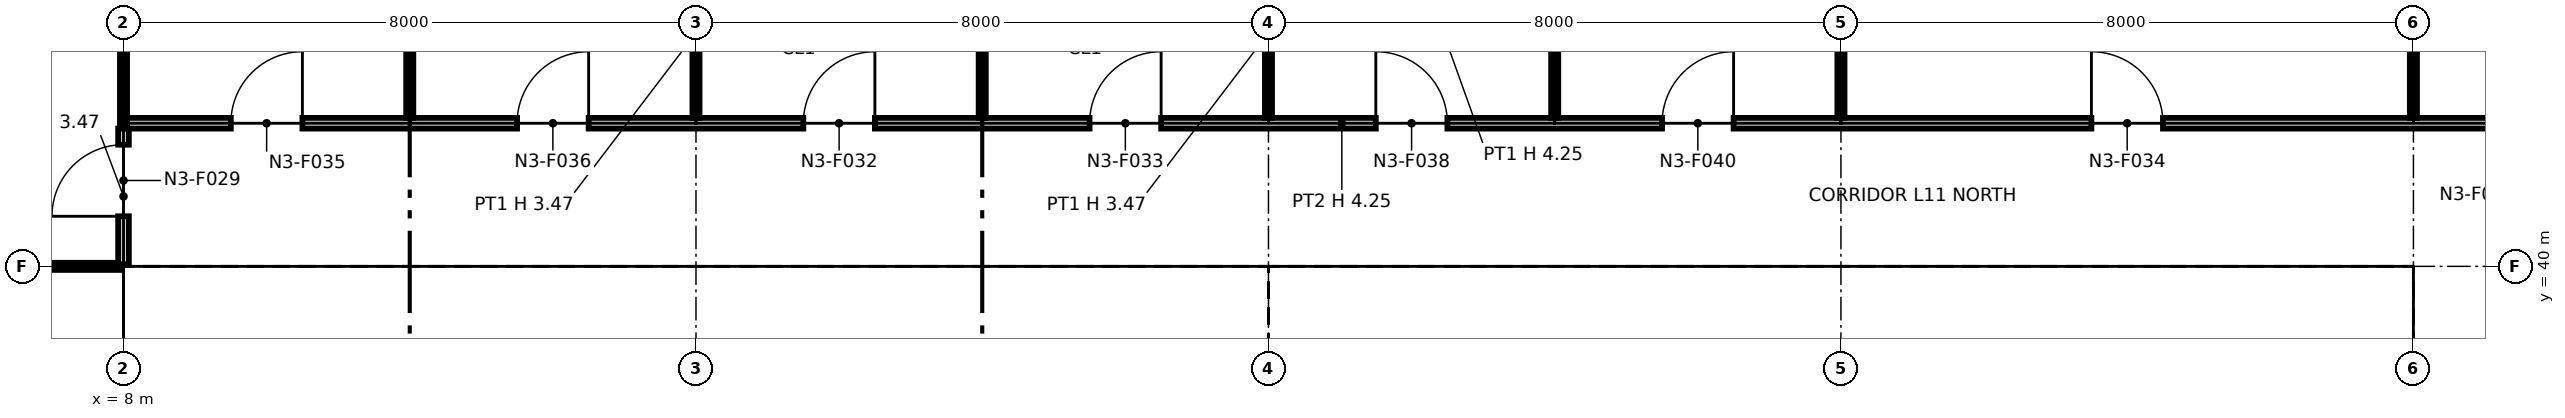
"""IFC4 building model, lengths in metres.
Left out: names, types, materials, properties, quantities, classifications, styles, units other than length and angle.
Written with IfcOpenShell. Run it as: python <this file> out.ifc"""

import sys

from ifc_helpers import new_model, si_unit, direction, frame, frame_2d, origin, origin_2d, place, context, subcontext, project, spatial, polyline, rectangle, i_section, outline, extrude, element, fill, save


model = new_model("IFC4")
c1 = context("Model", 3, precision=1e-05, world=origin(), true_north=direction((0.0, 1.0)))
c2 = subcontext(c1, "Body", "Model", "MODEL_VIEW")
j1 = project(units=[si_unit("LENGTHUNIT", "METRE"), si_unit("PLANEANGLEUNIT", "RADIAN")], contexts=[c1])
p1 = place(None, origin())
s1 = spatial("IfcSite", under=j1, at=p1, CompositionType="ELEMENT")
p2 = place(p1, origin())
s2 = spatial("IfcBuilding", under=s1, at=p2, CompositionType="ELEMENT")
p3 = place(p2, frame((0.0, 0.0, 65.6)))
s3 = spatial("IfcBuildingStorey", under=s2, at=p3, CompositionType="ELEMENT", Elevation=65.6)
for number, where, z_axis, x_axis in (
    (1, (8.0, 40.0, 0.0), (0.0, 0.0, 1.0), (1.0, 0.0, 0.0)),
    (2, (16.0, 40.0, 0.0), (0.0, 0.0, 1.0), (1.0, 0.0, 0.0)),
):
    element("IfcColumn", number, at=place(p3, frame(where, z_axis=z_axis, x_axis=x_axis)), inside=s3, PredefinedType="COLUMN", context=c2, shape_type="SweptSolid", body=[
        extrude(i_section(OverallWidth=0.394, OverallDepth=0.376, WebThickness=0.017, FlangeThickness=0.028, at=origin_2d()), origin(), (0.0, 0.0, 1.0), 4.25),
    ])
p4 = place(p3, frame((24.0, 40.0, 0.0), z_axis=(0.0, 0.0, 1.0), x_axis=(1.0, 0.0, 0.0)))
e3 = element("IfcColumn", 3, at=p4, inside=s3, PredefinedType="COLUMN", context=c2, shape_type="SweptSolid", body=[
    extrude(i_section(OverallWidth=0.399, OverallDepth=0.386, WebThickness=0.021, FlangeThickness=0.033, at=origin_2d()), origin(), (0.0, 0.0, 1.0), 4.25),
])
for number, where, z_axis, x_axis in (
    (4, (32.0, 40.0, 0.0), (0.0, 0.0, 1.0), (1.0, 0.0, 0.0)),
    (5, (40.0, 40.0, 0.0), (0.0, 0.0, 1.0), (1.0, 0.0, 0.0)),
):
    element("IfcColumn", number, at=place(p3, frame(where, z_axis=z_axis, x_axis=x_axis)), inside=s3, PredefinedType="COLUMN", context=c2, shape_type="SweptSolid", body=[
        extrude(i_section(OverallWidth=0.371, OverallDepth=0.361, WebThickness=0.012, FlangeThickness=0.02, at=origin_2d()), origin(), (0.0, 0.0, 1.0), 4.25),
    ])
p5 = place(p3, frame((8.75, 32.85, 0.0), z_axis=(0.0, 0.0, 1.0), x_axis=(0.0, 1.0, 0.0)))
e6 = element("IfcWall", 6, at=p5, inside=s3, PredefinedType="PARTITIONING", context=c2, shape_type="SweptSolid", body=[
    extrude(outline(polyline([(0.0, 0.0), (6.3, 0.0), (6.3, 4.25), (3.231, 4.25), (3.23, 3.789), (3.07, 3.789), (3.069, 4.25), (0.0, 4.25), (0.0, 0.0)])), frame((0.0, 0.1, 0.0), z_axis=(0.0, -1.0, 0.0), x_axis=(1.0, 0.0, 0.0)), (0.0, 0.0, 1.0), 0.2),
])
p6 = place(p3, frame((8.65, 39.25, 0.0), z_axis=(0.0, 0.0, 1.0), x_axis=(1.0, 0.0, 0.0)))
e7 = element("IfcWall", 7, at=p6, inside=s3, PredefinedType="PARTITIONING", context=c2, shape_type="SweptSolid", body=[
    extrude(outline(polyline([(0.0, 0.0), (14.7, 0.0), (14.7, 4.25), (7.469, 4.25), (7.469, 3.632), (7.231, 3.632), (7.23, 4.25), (0.0, 4.25), (0.0, 0.0)])), frame((0.0, 0.1, 0.0), z_axis=(0.0, -1.0, 0.0), x_axis=(1.0, 0.0, 0.0)), (0.0, 0.0, 1.0), 0.2),
])
for number, where, z_axis, x_axis in (
    (8, (11.875, 34.95, 0.0), (0.0, 0.0, 1.0), (0.0, 1.0, 0.0)),
    (9, (13.925, 34.95, 0.0), (0.0, 0.0, 1.0), (0.0, 1.0, 0.0)),
):
    element("IfcWall", number, at=place(p3, frame(where, z_axis=z_axis, x_axis=x_axis)), inside=s3, PredefinedType="PARTITIONING", context=c2, shape_type="SweptSolid", body=[
        extrude(outline(polyline([(0.0, 0.0), (4.2, 0.0), (4.2, 4.25), (1.132, 4.25), (1.131, 3.789), (0.969, 3.789), (0.969, 4.25), (0.0, 4.25), (0.0, 0.0)])), frame((0.0, 0.075, 0.0), z_axis=(0.0, -1.0, 0.0), x_axis=(1.0, 0.0, 0.0)), (0.0, 0.0, 1.0), 0.15),
    ])
p7 = place(p3, frame((16.0, 34.95, 0.0), z_axis=(0.0, 0.0, 1.0), x_axis=(0.0, 1.0, 0.0)))
e10 = element("IfcWall", 10, at=p7, inside=s3, PredefinedType="PARTITIONING", context=c2, shape_type="SweptSolid", body=[
    extrude(rectangle(XDim=4.2, YDim=0.6, at=frame_2d((2.1, 0.0))), origin(), (0.0, 0.0, 1.0), 3.632),
])
for number, where, z_axis, x_axis in (
    (11, (19.2, 32.85, 0.0), (0.0, 0.0, 1.0), (0.0, 1.0, 0.0)),
    (12, (23.25, 32.85, 0.0), (0.0, 0.0, 1.0), (0.0, 1.0, 0.0)),
):
    element("IfcWall", number, at=place(p3, frame(where, z_axis=z_axis, x_axis=x_axis)), inside=s3, PredefinedType="PARTITIONING", context=c2, shape_type="SweptSolid", body=[
        extrude(rectangle(XDim=6.3, YDim=0.2, at=frame_2d((3.15, 0.0))), origin(), (0.0, 0.0, 1.0), 4.25),
    ])
p8 = place(p3, frame((24.75, 32.85, 0.0), z_axis=(0.0, 0.0, 1.0), x_axis=(0.0, 1.0, 0.0)))
e13 = element("IfcWall", 13, at=p8, inside=s3, PredefinedType="PARTITIONING", context=c2, shape_type="SweptSolid", body=[
    extrude(outline(polyline([(0.0, 0.0), (6.3, 0.0), (6.3, 4.25), (3.231, 4.25), (3.23, 3.789), (3.07, 3.789), (3.069, 4.25), (0.0, 4.25), (0.0, 0.0)])), frame((0.0, 0.1, 0.0), z_axis=(0.0, -1.0, 0.0), x_axis=(1.0, 0.0, 0.0)), (0.0, 0.0, 1.0), 0.2),
])
p9 = place(p3, frame((24.65, 39.25, 0.0), z_axis=(0.0, 0.0, 1.0), x_axis=(1.0, 0.0, 0.0)))
e14 = element("IfcWall", 14, at=p9, inside=s3, PredefinedType="PARTITIONING", context=c2, shape_type="SweptSolid", body=[
    extrude(outline(polyline([(0.0, 0.0), (14.7, 0.0), (14.7, 4.25), (7.469, 4.25), (7.469, 3.632), (7.231, 3.632), (7.23, 4.25), (0.0, 4.25), (0.0, 0.0)])), frame((0.0, 0.1, 0.0), z_axis=(0.0, -1.0, 0.0), x_axis=(1.0, 0.0, 0.0)), (0.0, 0.0, 1.0), 0.2),
])
for number, where, z_axis, x_axis in (
    (15, (27.2, 36.6, 0.0), (0.0, 0.0, 1.0), (0.0, 1.0, 0.0)),
    (16, (29.5, 36.6, 0.0), (0.0, 0.0, 1.0), (0.0, 1.0, 0.0)),
):
    element("IfcWall", number, at=place(p3, frame(where, z_axis=z_axis, x_axis=x_axis)), inside=s3, PredefinedType="PARTITIONING", context=c2, shape_type="SweptSolid", body=[
        extrude(rectangle(XDim=2.55, YDim=0.2, at=frame_2d((1.275, 0.0))), origin(), (0.0, 0.0, 1.0), 4.25),
    ])
p10 = place(p3, frame((32.0, 36.6, 0.0), z_axis=(0.0, 0.0, 1.0), x_axis=(0.0, 1.0, 0.0)))
e17 = element("IfcWall", 17, at=p10, inside=s3, PredefinedType="PARTITIONING", context=c2, shape_type="SweptSolid", body=[
    extrude(rectangle(XDim=2.55, YDim=0.6, at=frame_2d((1.275, 0.0))), origin(), (0.0, 0.0, 1.0), 3.632),
])
for number, where, z_axis, x_axis in (
    (18, (35.6, 32.85, 0.0), (0.0, 0.0, 1.0), (0.0, 1.0, 0.0)),
    (19, (39.25, 32.85, 0.0), (0.0, 0.0, 1.0), (0.0, 1.0, 0.0)),
):
    element("IfcWall", number, at=place(p3, frame(where, z_axis=z_axis, x_axis=x_axis)), inside=s3, PredefinedType="PARTITIONING", context=c2, shape_type="SweptSolid", body=[
        extrude(rectangle(XDim=6.3, YDim=0.2, at=frame_2d((3.15, 0.0))), origin(), (0.0, 0.0, 1.0), 4.25),
    ])
p11 = place(p3, frame((4.05, 40.0, 0.0), z_axis=(0.0, 0.0, 1.0), x_axis=(1.0, 0.0, 0.0)))
e20 = element("IfcWall", 20, at=p11, inside=s3, PredefinedType="PARTITIONING", context=c2, shape_type="SweptSolid", body=[
    extrude(rectangle(XDim=3.92, YDim=0.1, at=frame_2d((1.96, 0.0))), origin(), (0.0, 0.0, 1.0), 3.47),
])
p12 = place(p3, frame((8.0, 40.03, 0.0), z_axis=(0.0, 0.0, 1.0), x_axis=(0.0, 1.0, 0.0)))
e21 = element("IfcWall", 21, at=p12, inside=s3, PredefinedType="PARTITIONING", context=c2, shape_type="SweptSolid", body=[
    extrude(rectangle(XDim=1.895, YDim=0.15, at=frame_2d((0.948, 0.0))), origin(), (0.0, 0.0, 1.0), 3.47),
])
p13 = place(p12, frame((0.67, 0.0, 0.0)))
e22 = element("IfcOpeningElement", 22, at=p13, cuts=e21, PredefinedType="OPENING", context=c2, shape_type="SweptSolid", body=[
    extrude(rectangle(XDim=1.0, YDim=2.1, at=frame_2d((0.5, 1.05))), frame((0.0, 0.085, 0.0), z_axis=(0.0, -1.0, 0.0), x_axis=(1.0, 0.0, 0.0)), (0.0, 0.0, 1.0), 0.17),
])
p14 = place(p3, frame((8.05, 42.0, 0.0), z_axis=(0.0, 0.0, 1.0), x_axis=(1.0, 0.0, 0.0)))
e23 = element("IfcWall", 23, at=p14, inside=s3, PredefinedType="PARTITIONING", context=c2, shape_type="SweptSolid", body=[
    extrude(rectangle(XDim=33.95, YDim=0.15, at=frame_2d((16.975, 0.0))), origin(), (0.0, 0.0, 1.0), 4.25),
])
p15 = place(p14, frame((9.45, 0.0, 0.0)))
e24 = element("IfcOpeningElement", 24, at=p15, cuts=e23, PredefinedType="OPENING", context=c2, shape_type="SweptSolid", body=[
    extrude(rectangle(XDim=1.0, YDim=2.1, at=frame_2d((0.5, 1.05))), frame((0.0, 0.085, 0.0), z_axis=(0.0, -1.0, 0.0), x_axis=(1.0, 0.0, 0.0)), (0.0, 0.0, 1.0), 0.17),
])
p16 = place(p14, frame((13.45, 0.0, 0.0)))
e25 = element("IfcOpeningElement", 25, at=p16, cuts=e23, PredefinedType="OPENING", context=c2, shape_type="SweptSolid", body=[
    extrude(rectangle(XDim=1.0, YDim=2.1, at=frame_2d((0.5, 1.05))), frame((0.0, 0.085, 0.0), z_axis=(0.0, -1.0, 0.0), x_axis=(1.0, 0.0, 0.0)), (0.0, 0.0, 1.0), 0.17),
])
p17 = place(p14, frame((27.45, 0.0, 0.0)))
e26 = element("IfcOpeningElement", 26, at=p17, cuts=e23, PredefinedType="OPENING", context=c2, shape_type="SweptSolid", body=[
    extrude(rectangle(XDim=1.0, YDim=2.1, at=frame_2d((0.5, 1.05))), frame((0.0, 0.085, 0.0), z_axis=(0.0, -1.0, 0.0), x_axis=(1.0, 0.0, 0.0)), (0.0, 0.0, 1.0), 0.17),
])
p18 = place(p14, frame((1.45, 0.0, 0.0)))
e27 = element("IfcOpeningElement", 27, at=p18, cuts=e23, PredefinedType="OPENING", context=c2, shape_type="SweptSolid", body=[
    extrude(rectangle(XDim=1.0, YDim=2.1, at=frame_2d((0.5, 1.05))), frame((0.0, 0.085, 0.0), z_axis=(0.0, -1.0, 0.0), x_axis=(1.0, 0.0, 0.0)), (0.0, 0.0, 1.0), 0.17),
])
p19 = place(p14, frame((5.45, 0.0, 0.0)))
e28 = element("IfcOpeningElement", 28, at=p19, cuts=e23, PredefinedType="OPENING", context=c2, shape_type="SweptSolid", body=[
    extrude(rectangle(XDim=1.0, YDim=2.1, at=frame_2d((0.5, 1.05))), frame((0.0, 0.085, 0.0), z_axis=(0.0, -1.0, 0.0), x_axis=(1.0, 0.0, 0.0)), (0.0, 0.0, 1.0), 0.17),
])
p20 = place(p14, frame((17.45, 0.0, 0.0)))
e29 = element("IfcOpeningElement", 29, at=p20, cuts=e23, PredefinedType="OPENING", context=c2, shape_type="SweptSolid", body=[
    extrude(rectangle(XDim=1.0, YDim=2.1, at=frame_2d((0.5, 1.05))), frame((0.0, 0.085, 0.0), z_axis=(0.0, -1.0, 0.0), x_axis=(1.0, 0.0, 0.0)), (0.0, 0.0, 1.0), 0.17),
])
p21 = place(p14, frame((21.45, 0.0, 0.0)))
e30 = element("IfcOpeningElement", 30, at=p21, cuts=e23, PredefinedType="OPENING", context=c2, shape_type="SweptSolid", body=[
    extrude(rectangle(XDim=1.0, YDim=2.1, at=frame_2d((0.5, 1.05))), frame((0.0, 0.085, 0.0), z_axis=(0.0, -1.0, 0.0), x_axis=(1.0, 0.0, 0.0)), (0.0, 0.0, 1.0), 0.17),
])
p22 = place(p3, frame((8.0, 42.0, 0.0), z_axis=(0.0, 0.0, 1.0), x_axis=(0.0, 1.0, 0.0)))
e31 = element("IfcWall", 31, at=p22, inside=s3, PredefinedType="PARTITIONING", context=c2, shape_type="SweptSolid", body=[
    extrude(rectangle(XDim=5.87, YDim=0.1, at=frame_2d((2.935, 0.0))), origin(), (0.0, 0.0, 1.0), 3.47),
])
for number, where, z_axis, x_axis in (
    (32, (12.0, 42.075, 0.0), (0.0, 0.0, 1.0), (0.0, 1.0, 0.0)),
    (33, (16.0, 42.075, 0.0), (0.0, 0.0, 1.0), (0.0, 1.0, 0.0)),
):
    element("IfcWall", number, at=place(p3, frame(where, z_axis=z_axis, x_axis=x_axis)), inside=s3, PredefinedType="PARTITIONING", context=c2, shape_type="SweptSolid", body=[
        extrude(rectangle(XDim=2.375, YDim=0.1, at=frame_2d((1.188, 0.0))), origin(), (0.0, 0.0, 1.0), 3.47),
    ])
p23 = place(p3, frame((20.0, 42.075, 0.0), z_axis=(0.0, 0.0, 1.0), x_axis=(0.0, 1.0, 0.0)))
e34 = element("IfcWall", 34, at=p23, inside=s3, PredefinedType="PARTITIONING", context=c2, shape_type="SweptSolid", body=[
    extrude(rectangle(XDim=3.095, YDim=0.1, at=frame_2d((1.547, 0.0))), origin(), (0.0, 0.0, 1.0), 3.47),
])
for number, where, z_axis, x_axis in (
    (35, (24.0, 42.075, 0.0), (0.0, 0.0, 1.0), (0.0, 1.0, 0.0)),
    (36, (28.0, 42.075, 0.0), (0.0, 0.0, 1.0), (0.0, 1.0, 0.0)),
):
    element("IfcWall", number, at=place(p3, frame(where, z_axis=z_axis, x_axis=x_axis)), inside=s3, PredefinedType="PARTITIONING", context=c2, shape_type="SweptSolid", body=[
        extrude(rectangle(XDim=2.375, YDim=0.1, at=frame_2d((1.188, 0.0))), origin(), (0.0, 0.0, 1.0), 3.47),
    ])
for number, where, z_axis, x_axis in (
    (37, (32.0, 42.075, 0.0), (0.0, 0.0, 1.0), (0.0, 1.0, 0.0)),
    (38, (40.0, 42.075, 0.0), (0.0, 0.0, 1.0), (0.0, 1.0, 0.0)),
):
    element("IfcWall", number, at=place(p3, frame(where, z_axis=z_axis, x_axis=x_axis)), inside=s3, PredefinedType="PARTITIONING", context=c2, shape_type="SweptSolid", body=[
        extrude(rectangle(XDim=3.095, YDim=0.1, at=frame_2d((1.547, 0.0))), origin(), (0.0, 0.0, 1.0), 3.47),
    ])
p24 = place(p13, origin())
e39 = element("IfcDoor", 39, at=p24, inside=s3, OperationType="SINGLE_SWING_LEFT", PredefinedType="DOOR", context=c2, shape_type="SweptSolid", body=[
    extrude(rectangle(XDim=1.0, YDim=2.1, at=frame_2d((0.5, 1.05))), frame((0.0, 0.025, 0.0), z_axis=(0.0, -1.0, 0.0), x_axis=(1.0, 0.0, 0.0)), (0.0, 0.0, 1.0), 0.05),
])
fill(e22, e39)
p25 = place(p15, origin())
e40 = element("IfcDoor", 40, at=p25, inside=s3, OperationType="SINGLE_SWING_RIGHT", PredefinedType="DOOR", context=c2, shape_type="SweptSolid", body=[
    extrude(rectangle(XDim=1.0, YDim=2.1, at=frame_2d((0.5, 1.05))), frame((0.0, 0.025, 0.0), z_axis=(0.0, -1.0, 0.0), x_axis=(1.0, 0.0, 0.0)), (0.0, 0.0, 1.0), 0.05),
])
fill(e24, e40)
p26 = place(p16, origin())
e41 = element("IfcDoor", 41, at=p26, inside=s3, OperationType="SINGLE_SWING_RIGHT", PredefinedType="DOOR", context=c2, shape_type="SweptSolid", body=[
    extrude(rectangle(XDim=1.0, YDim=2.1, at=frame_2d((0.5, 1.05))), frame((0.0, 0.025, 0.0), z_axis=(0.0, -1.0, 0.0), x_axis=(1.0, 0.0, 0.0)), (0.0, 0.0, 1.0), 0.05),
])
fill(e25, e41)
p27 = place(p17, origin())
e42 = element("IfcDoor", 42, at=p27, inside=s3, OperationType="SINGLE_SWING_LEFT", PredefinedType="DOOR", context=c2, shape_type="SweptSolid", body=[
    extrude(rectangle(XDim=1.0, YDim=2.1, at=frame_2d((0.5, 1.05))), frame((0.0, 0.025, 0.0), z_axis=(0.0, -1.0, 0.0), x_axis=(1.0, 0.0, 0.0)), (0.0, 0.0, 1.0), 0.05),
])
fill(e26, e42)
p28 = place(p18, origin())
e43 = element("IfcDoor", 43, at=p28, inside=s3, OperationType="SINGLE_SWING_RIGHT", PredefinedType="DOOR", context=c2, shape_type="SweptSolid", body=[
    extrude(rectangle(XDim=1.0, YDim=2.1, at=frame_2d((0.5, 1.05))), frame((0.0, 0.025, 0.0), z_axis=(0.0, -1.0, 0.0), x_axis=(1.0, 0.0, 0.0)), (0.0, 0.0, 1.0), 0.05),
])
fill(e27, e43)
p29 = place(p19, origin())
e44 = element("IfcDoor", 44, at=p29, inside=s3, OperationType="SINGLE_SWING_RIGHT", PredefinedType="DOOR", context=c2, shape_type="SweptSolid", body=[
    extrude(rectangle(XDim=1.0, YDim=2.1, at=frame_2d((0.5, 1.05))), frame((0.0, 0.025, 0.0), z_axis=(0.0, -1.0, 0.0), x_axis=(1.0, 0.0, 0.0)), (0.0, 0.0, 1.0), 0.05),
])
fill(e28, e44)
p30 = place(p20, origin())
e45 = element("IfcDoor", 45, at=p30, inside=s3, OperationType="SINGLE_SWING_LEFT", PredefinedType="DOOR", context=c2, shape_type="SweptSolid", body=[
    extrude(rectangle(XDim=1.0, YDim=2.1, at=frame_2d((0.5, 1.05))), frame((0.0, 0.025, 0.0), z_axis=(0.0, -1.0, 0.0), x_axis=(1.0, 0.0, 0.0)), (0.0, 0.0, 1.0), 0.05),
])
fill(e29, e45)
p31 = place(p21, origin())
e46 = element("IfcDoor", 46, at=p31, inside=s3, OperationType="SINGLE_SWING_RIGHT", PredefinedType="DOOR", context=c2, shape_type="SweptSolid", body=[
    extrude(rectangle(XDim=1.0, YDim=2.1, at=frame_2d((0.5, 1.05))), frame((0.0, 0.025, 0.0), z_axis=(0.0, -1.0, 0.0), x_axis=(1.0, 0.0, 0.0)), (0.0, 0.0, 1.0), 0.05),
])
fill(e30, e46)
save(model, sys.argv[1])
